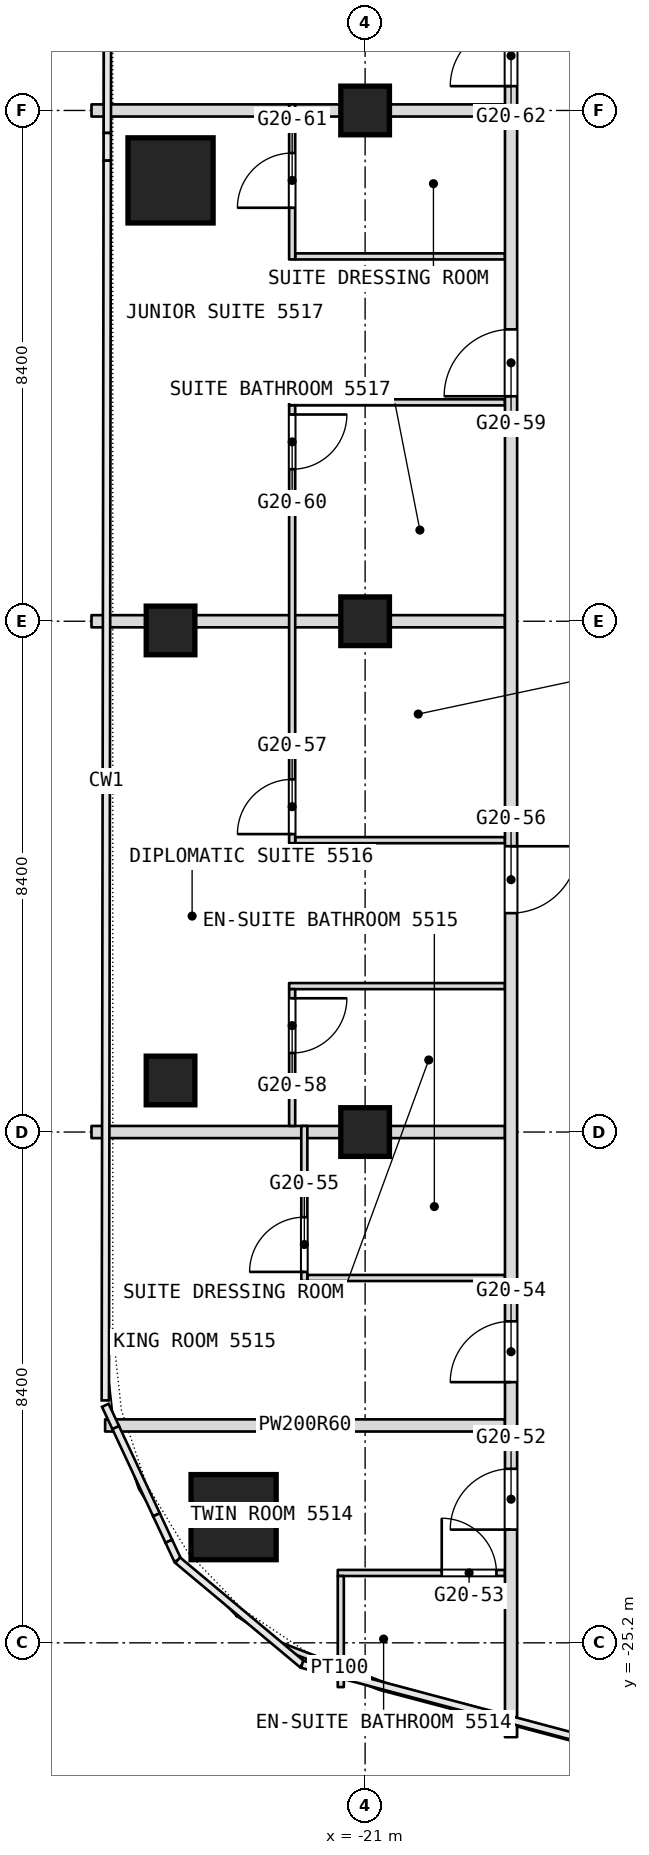
"""IFC4 building model, lengths in metres.
Left out: names, types, materials, properties, quantities, classifications, styles, units other than length and angle.
Written with IfcOpenShell. Run it as: python <this file> out.ifc"""

import sys

from ifc_helpers import new_model, si_unit, direction, frame, frame_2d, origin, origin_2d, place, context, subcontext, project, spatial, rectangle, extrude, element, fill, save


model = new_model("IFC4")
c1 = context("Model", 3, precision=1e-05, world=origin(), true_north=direction((0.0, 1.0)))
c2 = subcontext(c1, "Body", "Model", "MODEL_VIEW")
j1 = project(units=[si_unit("LENGTHUNIT", "METRE"), si_unit("PLANEANGLEUNIT", "RADIAN")], contexts=[c1])
p1 = place(None, origin())
s1 = spatial("IfcSite", under=j1, at=p1, CompositionType="ELEMENT")
p2 = place(p1, origin())
s2 = spatial("IfcBuilding", under=s1, at=p2, CompositionType="ELEMENT")
p3 = place(p2, frame((0.0, 0.0, 234.5)))
s3 = spatial("IfcBuildingStorey", under=s2, at=p3, CompositionType="ELEMENT", Elevation=234.5)
for number, where, z_axis, x_axis in (
    (1, (-23.163, -23.133, 0.0), (0.0, 0.0, 1.0), (1.0, 0.0, 0.0)),
    (2, (-24.2, -1.15, 0.0), (0.0, 0.0, 1.0), (1.0, 0.0, 0.0)),
):
    element("IfcColumn", number, at=place(p3, frame(where, z_axis=z_axis, x_axis=x_axis)), inside=s3, PredefinedType="COLUMN", context=c2, shape_type="SweptSolid", body=[
        extrude(rectangle(XDim=1.4, YDim=1.4, at=origin_2d()), origin(), (0.0, 0.0, 1.0), 3.6),
    ])
for number, where, z_axis, x_axis in (
    (3, (-21.0, -16.8, 0.0), (0.0, 0.0, 1.0), (1.0, 0.0, 0.0)),
    (4, (-21.0, -8.4, 0.0), (0.0, 0.0, 1.0), (1.0, 0.0, 0.0)),
    (5, (-21.0, 0.0, 0.0), (0.0, 0.0, 1.0), (1.0, 0.0, 0.0)),
    (6, (-24.2, -15.952, 0.0), (0.0, 0.0, 1.0), (1.0, 0.0, 0.0)),
    (7, (-24.2, -8.551, 0.0), (0.0, 0.0, 1.0), (1.0, 0.0, 0.0)),
):
    element("IfcColumn", number, at=place(p3, frame(where, z_axis=z_axis, x_axis=x_axis)), inside=s3, PredefinedType="COLUMN", context=c2, shape_type="SweptSolid", body=[
        extrude(rectangle(XDim=0.8, YDim=0.8, at=origin_2d()), origin(), (0.0, 0.0, 1.0), 3.6),
    ])
p4 = place(p3, frame((-22.386, -25.247, 0.0), z_axis=(0.0, 0.0, 1.0), x_axis=(0.932741240306, -0.360546499959, 0.0)))
e8 = element("IfcWall", 8, at=p4, inside=s3, PredefinedType="PARTITIONING", context=c2, shape_type="SweptSolid", body=[
    extrude(rectangle(XDim=2.066, YDim=0.1, at=frame_2d((1.033, 0.0))), origin(), (0.0, 0.0, 1.0), 3.34),
])
p5 = place(p3, frame((-21.45, -24.051, 0.0), z_axis=(0.0, 0.0, 1.0), x_axis=(1.0, 0.0, 0.0)))
e9 = element("IfcWall", 9, at=p5, inside=s3, PredefinedType="PARTITIONING", context=c2, shape_type="SweptSolid", body=[
    extrude(rectangle(XDim=2.75, YDim=0.1, at=frame_2d((1.375, 0.0))), origin(), (0.0, 0.0, 1.0), 3.34),
])
p6 = place(p5, frame((1.71, 0.0, 0.0)))
e10 = element("IfcOpeningElement", 10, at=p6, cuts=e9, PredefinedType="OPENING", context=c2, shape_type="SweptSolid", body=[
    extrude(rectangle(XDim=0.9, YDim=2.1, at=frame_2d((0.45, 1.05))), frame((0.0, 0.05, 0.0), z_axis=(0.0, -1.0, 0.0), x_axis=(1.0, 0.0, 0.0)), (0.0, 0.0, 1.0), 0.1),
])
p7 = place(p3, frame((-25.276, -21.625, 0.0), z_axis=(0.0, 0.0, 1.0), x_axis=(1.0, 0.0, 0.0)))
e11 = element("IfcWall", 11, at=p7, inside=s3, PredefinedType="PARTITIONING", context=c2, shape_type="SweptSolid", body=[
    extrude(rectangle(XDim=6.576, YDim=0.2, at=frame_2d((3.288, 0.0))), origin(), (0.0, 0.0, 1.0), 3.34),
])
p8 = place(p3, frame((-21.95, -19.2, 0.0), z_axis=(0.0, 0.0, 1.0), x_axis=(1.0, 0.0, 0.0)))
e12 = element("IfcWall", 12, at=p8, inside=s3, PredefinedType="PARTITIONING", context=c2, shape_type="SweptSolid", body=[
    extrude(rectangle(XDim=3.25, YDim=0.1, at=frame_2d((1.625, 0.0))), origin(), (0.0, 0.0, 1.0), 3.34),
])
p9 = place(p3, frame((-25.5, -16.8, 0.0), z_axis=(0.0, 0.0, 1.0), x_axis=(1.0, 0.0, 0.0)))
e13 = element("IfcWall", 13, at=p9, inside=s3, PredefinedType="PARTITIONING", context=c2, shape_type="SweptSolid", body=[
    extrude(rectangle(XDim=6.8, YDim=0.2, at=frame_2d((3.4, 0.0))), origin(), (0.0, 0.0, 1.0), 2.94),
])
p10 = place(p3, frame((-22.25, -14.4, 0.0), z_axis=(0.0, 0.0, 1.0), x_axis=(1.0, 0.0, 0.0)))
e14 = element("IfcWall", 14, at=p10, inside=s3, PredefinedType="PARTITIONING", context=c2, shape_type="SweptSolid", body=[
    extrude(rectangle(XDim=3.55, YDim=0.1, at=frame_2d((1.775, 0.0))), origin(), (0.0, 0.0, 1.0), 3.34),
])
p11 = place(p3, frame((-22.15, -12.0, 0.0), z_axis=(0.0, 0.0, 1.0), x_axis=(1.0, 0.0, 0.0)))
e15 = element("IfcWall", 15, at=p11, inside=s3, PredefinedType="PARTITIONING", context=c2, shape_type="SweptSolid", body=[
    extrude(rectangle(XDim=3.45, YDim=0.1, at=frame_2d((1.725, 0.0))), origin(), (0.0, 0.0, 1.0), 3.34),
])
p12 = place(p3, frame((-25.5, -8.4, 0.0), z_axis=(0.0, 0.0, 1.0), x_axis=(1.0, 0.0, 0.0)))
e16 = element("IfcWall", 16, at=p12, inside=s3, PredefinedType="PARTITIONING", context=c2, shape_type="SweptSolid", body=[
    extrude(rectangle(XDim=6.8, YDim=0.2, at=frame_2d((3.4, 0.0))), origin(), (0.0, 0.0, 1.0), 2.94),
])
p13 = place(p3, frame((-22.25, -4.8, 0.0), z_axis=(0.0, 0.0, 1.0), x_axis=(1.0, 0.0, 0.0)))
e17 = element("IfcWall", 17, at=p13, inside=s3, PredefinedType="PARTITIONING", context=c2, shape_type="SweptSolid", body=[
    extrude(rectangle(XDim=3.55, YDim=0.1, at=frame_2d((1.775, 0.0))), origin(), (0.0, 0.0, 1.0), 3.34),
])
p14 = place(p3, frame((-22.15, -2.4, 0.0), z_axis=(0.0, 0.0, 1.0), x_axis=(1.0, 0.0, 0.0)))
e18 = element("IfcWall", 18, at=p14, inside=s3, PredefinedType="PARTITIONING", context=c2, shape_type="SweptSolid", body=[
    extrude(rectangle(XDim=3.45, YDim=0.1, at=frame_2d((1.725, 0.0))), origin(), (0.0, 0.0, 1.0), 3.34),
])
p15 = place(p3, frame((-25.5, 0.0, 0.0), z_axis=(0.0, 0.0, 1.0), x_axis=(1.0, 0.0, 0.0)))
e19 = element("IfcWall", 19, at=p15, inside=s3, PredefinedType="PARTITIONING", context=c2, shape_type="SweptSolid", body=[
    extrude(rectangle(XDim=6.8, YDim=0.2, at=frame_2d((3.4, 0.0))), origin(), (0.0, 0.0, 1.0), 2.94),
])
p16 = place(p3, frame((-18.6, -26.751, 0.0), z_axis=(0.0, 0.0, 1.0), x_axis=(0.0, 1.0, 0.0)))
e20 = element("IfcWall", 20, at=p16, inside=s3, PredefinedType="PARTITIONING", context=c2, shape_type="SweptSolid", body=[
    extrude(rectangle(XDim=49.091, YDim=0.2, at=frame_2d((24.545, 0.0))), origin(), (0.0, 0.0, 1.0), 3.34),
])
p17 = place(p16, frame((3.413, 0.0, 0.0)))
e21 = element("IfcOpeningElement", 21, at=p17, cuts=e20, PredefinedType="OPENING", context=c2, shape_type="SweptSolid", body=[
    extrude(rectangle(XDim=1.0, YDim=2.1, at=frame_2d((0.5, 1.05))), frame((0.0, 0.1, 0.0), z_axis=(0.0, -1.0, 0.0), x_axis=(1.0, 0.0, 0.0)), (0.0, 0.0, 1.0), 0.2),
])
p18 = place(p16, frame((5.838, 0.0, 0.0)))
e22 = element("IfcOpeningElement", 22, at=p18, cuts=e20, PredefinedType="OPENING", context=c2, shape_type="SweptSolid", body=[
    extrude(rectangle(XDim=1.0, YDim=2.1, at=frame_2d((0.5, 1.05))), frame((0.0, 0.1, 0.0), z_axis=(0.0, -1.0, 0.0), x_axis=(1.0, 0.0, 0.0)), (0.0, 0.0, 1.0), 0.2),
])
p19 = place(p16, frame((13.551, 0.0, 0.0)))
e23 = element("IfcOpeningElement", 23, at=p19, cuts=e20, PredefinedType="OPENING", context=c2, shape_type="SweptSolid", body=[
    extrude(rectangle(XDim=1.1, YDim=2.1, at=frame_2d((0.55, 1.05))), frame((0.0, 0.1, 0.0), z_axis=(0.0, -1.0, 0.0), x_axis=(1.0, 0.0, 0.0)), (0.0, 0.0, 1.0), 0.2),
])
p20 = place(p16, frame((22.051, 0.0, 0.0)))
e24 = element("IfcOpeningElement", 24, at=p20, cuts=e20, PredefinedType="OPENING", context=c2, shape_type="SweptSolid", body=[
    extrude(rectangle(XDim=1.1, YDim=2.1, at=frame_2d((0.55, 1.05))), frame((0.0, 0.1, 0.0), z_axis=(0.0, -1.0, 0.0), x_axis=(1.0, 0.0, 0.0)), (0.0, 0.0, 1.0), 0.2),
])
p21 = place(p16, frame((27.151, 0.0, 0.0)))
e25 = element("IfcOpeningElement", 25, at=p21, cuts=e20, PredefinedType="OPENING", context=c2, shape_type="SweptSolid", body=[
    extrude(rectangle(XDim=1.0, YDim=2.1, at=frame_2d((0.5, 1.05))), frame((0.0, 0.1, 0.0), z_axis=(0.0, -1.0, 0.0), x_axis=(1.0, 0.0, 0.0)), (0.0, 0.0, 1.0), 0.2),
])
p22 = place(p16, frame((33.751, 0.0, 0.0)))
e26 = element("IfcOpeningElement", 26, at=p22, cuts=e20, PredefinedType="OPENING", context=c2, shape_type="SweptSolid", body=[
    extrude(rectangle(XDim=1.0, YDim=2.1, at=frame_2d((0.5, 1.05))), frame((0.0, 0.1, 0.0), z_axis=(0.0, -1.0, 0.0), x_axis=(1.0, 0.0, 0.0)), (0.0, 0.0, 1.0), 0.2),
])
p23 = place(p16, frame((37.951, 0.0, 0.0)))
e27 = element("IfcOpeningElement", 27, at=p23, cuts=e20, PredefinedType="OPENING", context=c2, shape_type="SweptSolid", body=[
    extrude(rectangle(XDim=1.0, YDim=2.1, at=frame_2d((0.5, 1.05))), frame((0.0, 0.1, 0.0), z_axis=(0.0, -1.0, 0.0), x_axis=(1.0, 0.0, 0.0)), (0.0, 0.0, 1.0), 0.2),
])
p24 = place(p16, frame((39.751, 0.0, 0.0)))
e28 = element("IfcOpeningElement", 28, at=p24, cuts=e20, PredefinedType="OPENING", context=c2, shape_type="SweptSolid", body=[
    extrude(rectangle(XDim=1.0, YDim=2.1, at=frame_2d((0.5, 1.05))), frame((0.0, 0.1, 0.0), z_axis=(0.0, -1.0, 0.0), x_axis=(1.0, 0.0, 0.0)), (0.0, 0.0, 1.0), 0.2),
])
p25 = place(p16, frame((44.051, 0.0, 0.0)))
e29 = element("IfcOpeningElement", 29, at=p25, cuts=e20, PredefinedType="OPENING", context=c2, shape_type="SweptSolid", body=[
    extrude(rectangle(XDim=1.0, YDim=2.1, at=frame_2d((0.5, 1.05))), frame((0.0, 0.1, 0.0), z_axis=(0.0, -1.0, 0.0), x_axis=(1.0, 0.0, 0.0)), (0.0, 0.0, 1.0), 0.2),
])
p26 = place(p3, frame((-21.4, -25.928, 0.0), z_axis=(0.0, 0.0, 1.0), x_axis=(0.0, 1.0, 0.0)))
e30 = element("IfcWall", 30, at=p26, inside=s3, PredefinedType="PARTITIONING", context=c2, shape_type="SweptSolid", body=[
    extrude(rectangle(XDim=1.827, YDim=0.1, at=frame_2d((0.914, 0.0))), origin(), (0.0, 0.0, 1.0), 3.34),
])
p27 = place(p3, frame((-22.0, -19.25, 0.0), z_axis=(0.0, 0.0, 1.0), x_axis=(0.0, 1.0, 0.0)))
e31 = element("IfcWall", 31, at=p27, inside=s3, PredefinedType="PARTITIONING", context=c2, shape_type="SweptSolid", body=[
    extrude(rectangle(XDim=2.55, YDim=0.1, at=frame_2d((1.275, 0.0))), origin(), (0.0, 0.0, 1.0), 3.34),
])
p28 = place(p27, frame((0.15, 0.0, 0.0)))
e32 = element("IfcOpeningElement", 32, at=p28, cuts=e31, PredefinedType="OPENING", context=c2, shape_type="SweptSolid", body=[
    extrude(rectangle(XDim=0.9, YDim=2.1, at=frame_2d((0.45, 1.05))), frame((0.0, 0.05, 0.0), z_axis=(0.0, -1.0, 0.0), x_axis=(1.0, 0.0, 0.0)), (0.0, 0.0, 1.0), 0.1),
])
p29 = place(p3, frame((-22.2, -16.7, 0.0), z_axis=(0.0, 0.0, 1.0), x_axis=(0.0, 1.0, 0.0)))
e33 = element("IfcWall", 33, at=p29, inside=s3, PredefinedType="PARTITIONING", context=c2, shape_type="SweptSolid", body=[
    extrude(rectangle(XDim=2.25, YDim=0.1, at=frame_2d((1.125, 0.0))), origin(), (0.0, 0.0, 1.0), 3.34),
])
p30 = place(p29, frame((1.2, 0.0, 0.0)))
e34 = element("IfcOpeningElement", 34, at=p30, cuts=e33, PredefinedType="OPENING", context=c2, shape_type="SweptSolid", body=[
    extrude(rectangle(XDim=0.9, YDim=2.1, at=frame_2d((0.45, 1.05))), frame((0.0, 0.05, 0.0), z_axis=(0.0, -1.0, 0.0), x_axis=(1.0, 0.0, 0.0)), (0.0, 0.0, 1.0), 0.1),
])
p31 = place(p3, frame((-22.2, -12.05, 0.0), z_axis=(0.0, 0.0, 1.0), x_axis=(0.0, 1.0, 0.0)))
e35 = element("IfcWall", 35, at=p31, inside=s3, PredefinedType="PARTITIONING", context=c2, shape_type="SweptSolid", body=[
    extrude(rectangle(XDim=7.2, YDim=0.1, at=frame_2d((3.6, 0.0))), origin(), (0.0, 0.0, 1.0), 3.34),
])
p32 = place(p31, frame((0.15, 0.0, 0.0)))
e36 = element("IfcOpeningElement", 36, at=p32, cuts=e35, PredefinedType="OPENING", context=c2, shape_type="SweptSolid", body=[
    extrude(rectangle(XDim=0.9, YDim=2.1, at=frame_2d((0.45, 1.05))), frame((0.0, 0.05, 0.0), z_axis=(0.0, -1.0, 0.0), x_axis=(1.0, 0.0, 0.0)), (0.0, 0.0, 1.0), 0.1),
])
p33 = place(p31, frame((6.15, 0.0, 0.0)))
e37 = element("IfcOpeningElement", 37, at=p33, cuts=e35, PredefinedType="OPENING", context=c2, shape_type="SweptSolid", body=[
    extrude(rectangle(XDim=0.9, YDim=2.1, at=frame_2d((0.45, 1.05))), frame((0.0, 0.05, 0.0), z_axis=(0.0, -1.0, 0.0), x_axis=(1.0, 0.0, 0.0)), (0.0, 0.0, 1.0), 0.1),
])
p34 = place(p3, frame((-22.2, -2.45, 0.0), z_axis=(0.0, 0.0, 1.0), x_axis=(0.0, 1.0, 0.0)))
e38 = element("IfcWall", 38, at=p34, inside=s3, PredefinedType="PARTITIONING", context=c2, shape_type="SweptSolid", body=[
    extrude(rectangle(XDim=2.55, YDim=0.1, at=frame_2d((1.275, 0.0))), origin(), (0.0, 0.0, 1.0), 3.34),
])
p35 = place(p34, frame((0.85, 0.0, 0.0)))
e39 = element("IfcOpeningElement", 39, at=p35, cuts=e38, PredefinedType="OPENING", context=c2, shape_type="SweptSolid", body=[
    extrude(rectangle(XDim=0.9, YDim=2.1, at=frame_2d((0.45, 1.05))), frame((0.0, 0.05, 0.0), z_axis=(0.0, -1.0, 0.0), x_axis=(1.0, 0.0, 0.0)), (0.0, 0.0, 1.0), 0.1),
])
p36 = place(p6, origin())
e40 = element("IfcDoor", 40, at=p36, inside=s3, OperationType="SINGLE_SWING_LEFT", PredefinedType="DOOR", context=c2, shape_type="SweptSolid", body=[
    extrude(rectangle(XDim=0.9, YDim=2.1, at=frame_2d((0.45, 1.05))), frame((0.0, 0.025, 0.0), z_axis=(0.0, -1.0, 0.0), x_axis=(1.0, 0.0, 0.0)), (0.0, 0.0, 1.0), 0.05),
])
fill(e10, e40)
p37 = place(p17, origin())
e41 = element("IfcDoor", 41, at=p37, inside=s3, OperationType="SINGLE_SWING_LEFT", PredefinedType="DOOR", context=c2, shape_type="SweptSolid", body=[
    extrude(rectangle(XDim=1.0, YDim=2.1, at=frame_2d((0.5, 1.05))), frame((0.0, 0.025, 0.0), z_axis=(0.0, -1.0, 0.0), x_axis=(1.0, 0.0, 0.0)), (0.0, 0.0, 1.0), 0.05),
])
fill(e21, e41)
p38 = place(p18, origin())
e42 = element("IfcDoor", 42, at=p38, inside=s3, OperationType="SINGLE_SWING_LEFT", PredefinedType="DOOR", context=c2, shape_type="SweptSolid", body=[
    extrude(rectangle(XDim=1.0, YDim=2.1, at=frame_2d((0.5, 1.05))), frame((0.0, 0.025, 0.0), z_axis=(0.0, -1.0, 0.0), x_axis=(1.0, 0.0, 0.0)), (0.0, 0.0, 1.0), 0.05),
])
fill(e22, e42)
p39 = place(p19, origin())
e43 = element("IfcDoor", 43, at=p39, inside=s3, OperationType="SINGLE_SWING_RIGHT", PredefinedType="DOOR", context=c2, shape_type="SweptSolid", body=[
    extrude(rectangle(XDim=1.1, YDim=2.1, at=frame_2d((0.55, 1.05))), frame((0.0, 0.025, 0.0), z_axis=(0.0, -1.0, 0.0), x_axis=(1.0, 0.0, 0.0)), (0.0, 0.0, 1.0), 0.05),
])
fill(e23, e43)
p40 = place(p20, origin())
e44 = element("IfcDoor", 44, at=p40, inside=s3, OperationType="SINGLE_SWING_LEFT", PredefinedType="DOOR", context=c2, shape_type="SweptSolid", body=[
    extrude(rectangle(XDim=1.1, YDim=2.1, at=frame_2d((0.55, 1.05))), frame((0.0, 0.025, 0.0), z_axis=(0.0, -1.0, 0.0), x_axis=(1.0, 0.0, 0.0)), (0.0, 0.0, 1.0), 0.05),
])
fill(e24, e44)
p41 = place(p21, origin())
e45 = element("IfcDoor", 45, at=p41, inside=s3, OperationType="SINGLE_SWING_LEFT", PredefinedType="DOOR", context=c2, shape_type="SweptSolid", body=[
    extrude(rectangle(XDim=1.0, YDim=2.1, at=frame_2d((0.5, 1.05))), frame((0.0, 0.025, 0.0), z_axis=(0.0, -1.0, 0.0), x_axis=(1.0, 0.0, 0.0)), (0.0, 0.0, 1.0), 0.05),
])
fill(e25, e45)
p42 = place(p28, origin())
e46 = element("IfcDoor", 46, at=p42, inside=s3, OperationType="SINGLE_SWING_RIGHT", PredefinedType="DOOR", context=c2, shape_type="SweptSolid", body=[
    extrude(rectangle(XDim=0.9, YDim=2.1, at=frame_2d((0.45, 1.05))), frame((0.0, 0.025, 0.0), z_axis=(0.0, -1.0, 0.0), x_axis=(1.0, 0.0, 0.0)), (0.0, 0.0, 1.0), 0.05),
])
fill(e32, e46)
p43 = place(p30, origin())
e47 = element("IfcDoor", 47, at=p43, inside=s3, OperationType="SINGLE_SWING_LEFT", PredefinedType="DOOR", context=c2, shape_type="SweptSolid", body=[
    extrude(rectangle(XDim=0.9, YDim=2.1, at=frame_2d((0.45, 1.05))), frame((0.0, 0.025, 0.0), z_axis=(0.0, -1.0, 0.0), x_axis=(1.0, 0.0, 0.0)), (0.0, 0.0, 1.0), 0.05),
])
fill(e34, e47)
p44 = place(p32, origin())
e48 = element("IfcDoor", 48, at=p44, inside=s3, OperationType="SINGLE_SWING_RIGHT", PredefinedType="DOOR", context=c2, shape_type="SweptSolid", body=[
    extrude(rectangle(XDim=0.9, YDim=2.1, at=frame_2d((0.45, 1.05))), frame((0.0, 0.025, 0.0), z_axis=(0.0, -1.0, 0.0), x_axis=(1.0, 0.0, 0.0)), (0.0, 0.0, 1.0), 0.05),
])
fill(e36, e48)
p45 = place(p33, origin())
e49 = element("IfcDoor", 49, at=p45, inside=s3, OperationType="SINGLE_SWING_LEFT", PredefinedType="DOOR", context=c2, shape_type="SweptSolid", body=[
    extrude(rectangle(XDim=0.9, YDim=2.1, at=frame_2d((0.45, 1.05))), frame((0.0, 0.025, 0.0), z_axis=(0.0, -1.0, 0.0), x_axis=(1.0, 0.0, 0.0)), (0.0, 0.0, 1.0), 0.05),
])
fill(e37, e49)
p46 = place(p35, origin())
e50 = element("IfcDoor", 50, at=p46, inside=s3, OperationType="SINGLE_SWING_LEFT", PredefinedType="DOOR", context=c2, shape_type="SweptSolid", body=[
    extrude(rectangle(XDim=0.9, YDim=2.1, at=frame_2d((0.45, 1.05))), frame((0.0, 0.025, 0.0), z_axis=(0.0, -1.0, 0.0), x_axis=(1.0, 0.0, 0.0)), (0.0, 0.0, 1.0), 0.05),
])
fill(e39, e50)
save(model, sys.argv[1])
